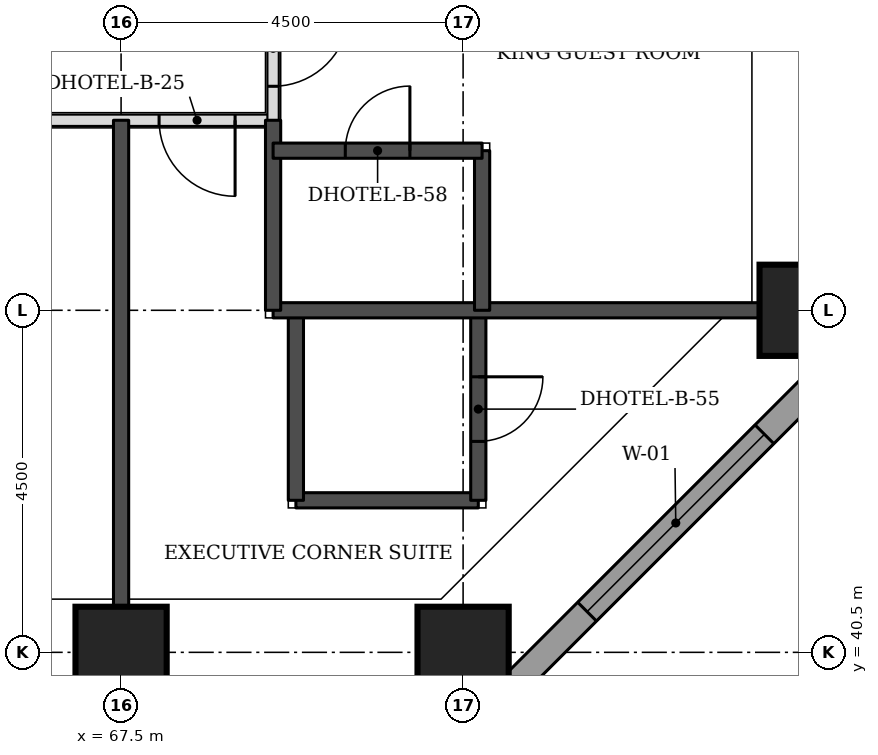
"""IFC4 building model, lengths in metres.
Left out: names, types, materials, properties, quantities, classifications, styles, units other than length and angle.
Written with IfcOpenShell. Run it as: python <this file> out.ifc"""

import sys

from ifc_helpers import new_model, si_unit, direction, frame, frame_2d, origin, origin_2d, place, context, subcontext, project, spatial, rectangle, extrude, element, fill, save


model = new_model("IFC4")
c1 = context("Model", 3, precision=1e-05, world=origin(), true_north=direction((0.0, 1.0)))
c2 = subcontext(c1, "Body", "Model", "MODEL_VIEW")
j1 = project(units=[si_unit("LENGTHUNIT", "METRE"), si_unit("PLANEANGLEUNIT", "RADIAN")], contexts=[c1])
p1 = place(None, origin())
s1 = spatial("IfcSite", under=j1, at=p1, CompositionType="ELEMENT")
p2 = place(p1, origin())
s2 = spatial("IfcBuilding", under=s1, at=p2, CompositionType="ELEMENT")
p3 = place(p2, frame((0.0, 0.0, 52.8)))
s3 = spatial("IfcBuildingStorey", under=s2, at=p3, CompositionType="ELEMENT", Elevation=52.8)
for number, where, z_axis, x_axis in (
    (1, (67.5, 40.5, 0.0), (0.0, 0.0, 1.0), (1.0, 0.0, 0.0)),
    (2, (72.0, 40.5, 0.0), (0.0, 0.0, 1.0), (1.0, 0.0, 0.0)),
    (3, (76.5, 45.0, 0.0), (0.0, 0.0, 1.0), (1.0, 0.0, 0.0)),
):
    element("IfcColumn", number, at=place(p3, frame(where, z_axis=z_axis, x_axis=x_axis)), inside=s3, PredefinedType="COLUMN", context=c2, shape_type="SweptSolid", body=[
        extrude(rectangle(XDim=1.2, YDim=1.2, at=origin_2d()), origin(), (0.0, 0.0, 1.0), 3.3),
    ])
p4 = place(p3, frame((72.27, 39.674, 0.0), z_axis=(0.0, 0.0, 1.0), x_axis=(0.707106781187, 0.707106781187, 0.0)))
e4 = element("IfcWall", 4, at=p4, inside=s3, PredefinedType="STANDARD", context=c2, shape_type="SweptSolid", body=[
    extrude(rectangle(XDim=7.151, YDim=0.35, at=frame_2d((3.576, 0.0))), origin(), (0.0, 0.0, 1.0), 3.055),
])
p5 = place(p4, frame((1.926, 0.0, 0.8)))
e5 = element("IfcOpeningElement", 5, at=p5, cuts=e4, PredefinedType="OPENING", context=c2, shape_type="SweptSolid", body=[
    extrude(rectangle(XDim=3.3, YDim=1.5, at=frame_2d((1.65, 0.75))), frame((0.0, 0.185, 0.0), z_axis=(0.0, -1.0, 0.0), x_axis=(1.0, 0.0, 0.0)), (0.0, 0.0, 1.0), 0.37),
])
p6 = place(p3, frame((52.85, 47.5, 0.0), z_axis=(0.0, 0.0, 1.0), x_axis=(1.0, 0.0, 0.0)))
e6 = element("IfcWall", 6, at=p6, inside=s3, PredefinedType="PARTITIONING", context=c2, shape_type="SweptSolid", body=[
    extrude(rectangle(XDim=16.65, YDim=0.15, at=frame_2d((8.325, 0.0))), origin(), (0.0, 0.0, 1.0), 3.08),
])
p7 = place(p6, frame((11.3, 0.0, 0.0)))
e7 = element("IfcOpeningElement", 7, at=p7, cuts=e6, PredefinedType="OPENING", context=c2, shape_type="SweptSolid", body=[
    extrude(rectangle(XDim=1.1, YDim=2.1, at=frame_2d((0.55, 1.05))), frame((0.0, 0.085, 0.0), z_axis=(0.0, -1.0, 0.0), x_axis=(1.0, 0.0, 0.0)), (0.0, 0.0, 1.0), 0.17),
])
p8 = place(p6, frame((15.15, 0.0, 0.0)))
e8 = element("IfcOpeningElement", 8, at=p8, cuts=e6, PredefinedType="OPENING", context=c2, shape_type="SweptSolid", body=[
    extrude(rectangle(XDim=1.0, YDim=2.1, at=frame_2d((0.5, 1.05))), frame((0.0, 0.085, 0.0), z_axis=(0.0, -1.0, 0.0), x_axis=(1.0, 0.0, 0.0)), (0.0, 0.0, 1.0), 0.17),
])
p9 = place(p3, frame((69.5, 47.5, 0.0), z_axis=(0.0, 0.0, 1.0), x_axis=(0.0, 1.0, 0.0)))
e9 = element("IfcWall", 9, at=p9, inside=s3, PredefinedType="PARTITIONING", context=c2, shape_type="SweptSolid", body=[
    extrude(rectangle(XDim=26.5, YDim=0.15, at=frame_2d((13.25, 0.0))), origin(), (0.0, 0.0, 1.0), 3.08),
])
p10 = place(p9, frame((24.95, 0.0, 0.0)))
e10 = element("IfcOpeningElement", 10, at=p10, cuts=e9, PredefinedType="OPENING", context=c2, shape_type="SweptSolid", body=[
    extrude(rectangle(XDim=1.0, YDim=2.1, at=frame_2d((0.5, 1.05))), frame((0.0, 0.085, 0.0), z_axis=(0.0, -1.0, 0.0), x_axis=(1.0, 0.0, 0.0)), (0.0, 0.0, 1.0), 0.17),
])
p11 = place(p9, frame((20.7, 0.0, 0.0)))
e11 = element("IfcOpeningElement", 11, at=p11, cuts=e9, PredefinedType="OPENING", context=c2, shape_type="SweptSolid", body=[
    extrude(rectangle(XDim=1.0, YDim=2.1, at=frame_2d((0.5, 1.05))), frame((0.0, 0.085, 0.0), z_axis=(0.0, -1.0, 0.0), x_axis=(1.0, 0.0, 0.0)), (0.0, 0.0, 1.0), 0.17),
])
p12 = place(p9, frame((18.55, 0.0, 0.0)))
e12 = element("IfcOpeningElement", 12, at=p12, cuts=e9, PredefinedType="OPENING", context=c2, shape_type="SweptSolid", body=[
    extrude(rectangle(XDim=1.0, YDim=2.1, at=frame_2d((0.5, 1.05))), frame((0.0, 0.085, 0.0), z_axis=(0.0, -1.0, 0.0), x_axis=(1.0, 0.0, 0.0)), (0.0, 0.0, 1.0), 0.17),
])
p13 = place(p9, frame((11.7, 0.0, 0.0)))
e13 = element("IfcOpeningElement", 13, at=p13, cuts=e9, PredefinedType="OPENING", context=c2, shape_type="SweptSolid", body=[
    extrude(rectangle(XDim=1.0, YDim=2.1, at=frame_2d((0.5, 1.05))), frame((0.0, 0.085, 0.0), z_axis=(0.0, -1.0, 0.0), x_axis=(1.0, 0.0, 0.0)), (0.0, 0.0, 1.0), 0.17),
])
p14 = place(p9, frame((7.65, 0.0, 0.0)))
e14 = element("IfcOpeningElement", 14, at=p14, cuts=e9, PredefinedType="OPENING", context=c2, shape_type="SweptSolid", body=[
    extrude(rectangle(XDim=1.1, YDim=2.1, at=frame_2d((0.55, 1.05))), frame((0.0, 0.085, 0.0), z_axis=(0.0, -1.0, 0.0), x_axis=(1.0, 0.0, 0.0)), (0.0, 0.0, 1.0), 0.17),
])
p15 = place(p9, frame((0.447, 0.0, 0.0)))
e15 = element("IfcOpeningElement", 15, at=p15, cuts=e9, PredefinedType="OPENING", context=c2, shape_type="SweptSolid", body=[
    extrude(rectangle(XDim=1.0, YDim=2.1, at=frame_2d((0.5, 1.05))), frame((0.0, 0.085, 0.0), z_axis=(0.0, -1.0, 0.0), x_axis=(1.0, 0.0, 0.0)), (0.0, 0.0, 1.0), 0.17),
])
p16 = place(p3, frame((67.5, 41.1, 0.0), z_axis=(0.0, 0.0, 1.0), x_axis=(0.0, 1.0, 0.0)))
e16 = element("IfcWall", 16, at=p16, inside=s3, PredefinedType="SOLIDWALL", context=c2, shape_type="SweptSolid", body=[
    extrude(rectangle(XDim=6.4, YDim=0.2, at=frame_2d((3.2, 0.0))), origin(), (0.0, 0.0, 1.0), 3.08),
])
p17 = place(p3, frame((69.8, 42.5, 0.0), z_axis=(0.0, 0.0, 1.0), x_axis=(1.0, 0.0, 0.0)))
e17 = element("IfcWall", 17, at=p17, inside=s3, PredefinedType="SOLIDWALL", context=c2, shape_type="SweptSolid", body=[
    extrude(rectangle(XDim=2.4, YDim=0.2, at=frame_2d((1.2, 0.0))), origin(), (0.0, 0.0, 1.0), 3.08),
])
p18 = place(p3, frame((69.8, 42.5, 0.0), z_axis=(0.0, 0.0, 1.0), x_axis=(0.0, 1.0, 0.0)))
e18 = element("IfcWall", 18, at=p18, inside=s3, PredefinedType="SOLIDWALL", context=c2, shape_type="SweptSolid", body=[
    extrude(rectangle(XDim=2.5, YDim=0.2, at=frame_2d((1.25, 0.0))), origin(), (0.0, 0.0, 1.0), 3.08),
])
p19 = place(p3, frame((72.2, 42.5, 0.0), z_axis=(0.0, 0.0, 1.0), x_axis=(0.0, 1.0, 0.0)))
e19 = element("IfcWall", 19, at=p19, inside=s3, PredefinedType="SOLIDWALL", context=c2, shape_type="SweptSolid", body=[
    extrude(rectangle(XDim=2.5, YDim=0.2, at=frame_2d((1.25, 0.0))), origin(), (0.0, 0.0, 1.0), 3.08),
])
p20 = place(p19, frame((0.775, 0.0, 0.0)))
e20 = element("IfcOpeningElement", 20, at=p20, cuts=e19, PredefinedType="OPENING", context=c2, shape_type="SweptSolid", body=[
    extrude(rectangle(XDim=0.85, YDim=2.1, at=frame_2d((0.425, 1.05))), frame((0.0, 0.11, 0.0), z_axis=(0.0, -1.0, 0.0), x_axis=(1.0, 0.0, 0.0)), (0.0, 0.0, 1.0), 0.22),
])
p21 = place(p3, frame((69.5, 45.0, 0.0), z_axis=(0.0, 0.0, 1.0), x_axis=(1.0, 0.0, 0.0)))
e21 = element("IfcWall", 21, at=p21, inside=s3, PredefinedType="SOLIDWALL", context=c2, shape_type="SweptSolid", body=[
    extrude(rectangle(XDim=6.4, YDim=0.2, at=frame_2d((3.2, 0.0))), origin(), (0.0, 0.0, 1.0), 3.08),
])
p22 = place(p3, frame((69.5, 45.0, 0.0), z_axis=(0.0, 0.0, 1.0), x_axis=(0.0, 1.0, 0.0)))
e22 = element("IfcWall", 22, at=p22, inside=s3, PredefinedType="SOLIDWALL", context=c2, shape_type="SweptSolid", body=[
    extrude(rectangle(XDim=2.5, YDim=0.2, at=frame_2d((1.25, 0.0))), origin(), (0.0, 0.0, 1.0), 3.08),
])
p23 = place(p3, frame((72.25, 45.0, 0.0), z_axis=(0.0, 0.0, 1.0), x_axis=(0.0, 1.0, 0.0)))
e23 = element("IfcWall", 23, at=p23, inside=s3, PredefinedType="SOLIDWALL", context=c2, shape_type="SweptSolid", body=[
    extrude(rectangle(XDim=2.1, YDim=0.2, at=frame_2d((1.05, 0.0))), origin(), (0.0, 0.0, 1.0), 3.08),
])
p24 = place(p3, frame((69.5, 47.1, 0.0), z_axis=(0.0, 0.0, 1.0), x_axis=(1.0, 0.0, 0.0)))
e24 = element("IfcWall", 24, at=p24, inside=s3, PredefinedType="SOLIDWALL", context=c2, shape_type="SweptSolid", body=[
    extrude(rectangle(XDim=2.75, YDim=0.2, at=frame_2d((1.375, 0.0))), origin(), (0.0, 0.0, 1.0), 3.08),
])
p25 = place(p24, frame((0.95, 0.0, 0.0)))
e25 = element("IfcOpeningElement", 25, at=p25, cuts=e24, PredefinedType="OPENING", context=c2, shape_type="SweptSolid", body=[
    extrude(rectangle(XDim=0.85, YDim=2.1, at=frame_2d((0.425, 1.05))), frame((0.0, 0.11, 0.0), z_axis=(0.0, -1.0, 0.0), x_axis=(1.0, 0.0, 0.0)), (0.0, 0.0, 1.0), 0.22),
])
p26 = place(p5, origin())
e26 = element("IfcWindow", 26, at=p26, inside=s3, PartitioningType="SINGLE_PANEL", PredefinedType="WINDOW", context=c2, shape_type="SweptSolid", body=[
    extrude(rectangle(XDim=3.3, YDim=1.5, at=frame_2d((1.65, 0.75))), frame((0.0, 0.085, 0.0), z_axis=(0.0, -1.0, 0.0), x_axis=(1.0, 0.0, 0.0)), (0.0, 0.0, 1.0), 0.06),
])
fill(e5, e26)
p27 = place(p15, frame((1.0, 0.0, 0.0), z_axis=(0.0, 0.0, 1.0), x_axis=(-1.0, 0.0, 0.0)))
e27 = element("IfcDoor", 27, at=p27, inside=s3, OperationType="SINGLE_SWING_LEFT", PredefinedType="DOOR", context=c2, shape_type="SweptSolid", body=[
    extrude(rectangle(XDim=1.0, YDim=2.1, at=frame_2d((0.5, 1.05))), frame((0.0, 0.025, 0.0), z_axis=(0.0, -1.0, 0.0), x_axis=(1.0, 0.0, 0.0)), (0.0, 0.0, 1.0), 0.05),
])
fill(e15, e27)
p28 = place(p25, origin())
e28 = element("IfcDoor", 28, at=p28, inside=s3, OperationType="SINGLE_SWING_RIGHT", PredefinedType="DOOR", context=c2, shape_type="SweptSolid", body=[
    extrude(rectangle(XDim=0.85, YDim=2.1, at=frame_2d((0.425, 1.05))), frame((0.0, 0.025, 0.0), z_axis=(0.0, -1.0, 0.0), x_axis=(1.0, 0.0, 0.0)), (0.0, 0.0, 1.0), 0.05),
])
fill(e25, e28)
p29 = place(p8, frame((1.0, 0.0, 0.0), z_axis=(0.0, 0.0, 1.0), x_axis=(-1.0, 0.0, 0.0)))
e29 = element("IfcDoor", 29, at=p29, inside=s3, OperationType="SINGLE_SWING_LEFT", PredefinedType="DOOR", context=c2, shape_type="SweptSolid", body=[
    extrude(rectangle(XDim=1.0, YDim=2.1, at=frame_2d((0.5, 1.05))), frame((0.0, 0.025, 0.0), z_axis=(0.0, -1.0, 0.0), x_axis=(1.0, 0.0, 0.0)), (0.0, 0.0, 1.0), 0.05),
])
fill(e8, e29)
p30 = place(p20, frame((0.85, 0.0, 0.0), z_axis=(0.0, 0.0, 1.0), x_axis=(-1.0, 0.0, 0.0)))
e30 = element("IfcDoor", 30, at=p30, inside=s3, OperationType="SINGLE_SWING_LEFT", PredefinedType="DOOR", context=c2, shape_type="SweptSolid", body=[
    extrude(rectangle(XDim=0.85, YDim=2.1, at=frame_2d((0.425, 1.05))), frame((0.0, 0.025, 0.0), z_axis=(0.0, -1.0, 0.0), x_axis=(1.0, 0.0, 0.0)), (0.0, 0.0, 1.0), 0.05),
])
fill(e20, e30)
save(model, sys.argv[1])
